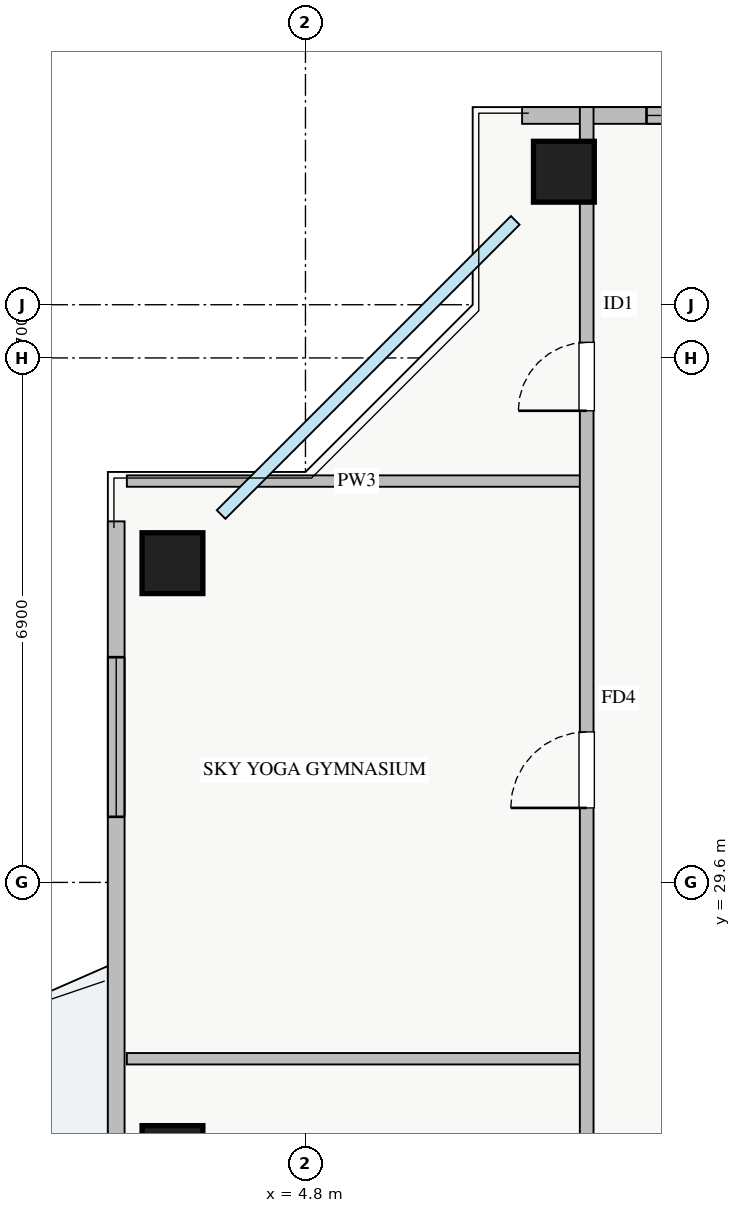
"""IFC4 building model, lengths in metres.
Left out: names, types, materials, properties, quantities, classifications, styles, units other than length and angle.
Written with IfcOpenShell. Run it as: python <this file> out.ifc"""

import sys

from ifc_helpers import new_model, si_unit, direction, frame, frame_2d, origin, origin_2d, place, context, subcontext, project, spatial, rectangle, extrude, source, transform, mapped, element, fill, save


model = new_model("IFC4")
c1 = context("Model", 3, precision=1e-05, world=origin(), true_north=direction((0.0, 1.0)))
c2 = subcontext(c1, "Body", "Model", "MODEL_VIEW")
j1 = project(units=[si_unit("LENGTHUNIT", "METRE"), si_unit("PLANEANGLEUNIT", "RADIAN")], contexts=[c1])
p1 = place(None, origin())
s1 = spatial("IfcSite", under=j1, at=p1, CompositionType="ELEMENT")
p2 = place(p1, origin())
s2 = spatial("IfcBuilding", under=s1, at=p2, CompositionType="ELEMENT")
p3 = place(p2, frame((0.0, 0.0, 223.0)))
s3 = spatial("IfcBuildingStorey", under=s2, at=p3, CompositionType="ELEMENT", Elevation=223.0)
m1 = source(origin(), c2, "Body", "SweptSolid", [
    extrude(rectangle(XDim=0.8, YDim=0.8, at=origin_2d()), origin(), (0.0, 0.0, 1.0), 3.25),
])
for number, where, z_axis, x_axis in (
    (1, (8.2, 38.95, 0.0), (0.0, 0.0, 1.0), (1.0, 0.0, 0.0)),
    (2, (3.05, 33.8, 0.0), (0.0, 0.0, 1.0), (1.0, 0.0, 0.0)),
    (3, (3.05, 26.0, 0.0), (0.0, 0.0, 1.0), (1.0, 0.0, 0.0)),
):
    element("IfcColumn", number, at=place(p3, frame(where, z_axis=z_axis, x_axis=x_axis)), inside=s3, PredefinedType="COLUMN", context=c2, shape_type="MappedRepresentation", body=[
        mapped(m1, transform((0.0, 0.0, 0.0), x_axis=(1.0, 0.0, 0.0), y_axis=(0.0, 1.0, 0.0), z_axis=(0.0, 0.0, 1.0), scale=1.0)),
    ])
p4 = place(p3, frame((7.65, 39.69, 0.0), z_axis=(0.0, 0.0, 1.0), x_axis=(1.0, 0.0, 0.0)))
e4 = element("IfcWall", 4, at=p4, inside=s3, PredefinedType="STANDARD", context=c2, shape_type="SweptSolid", body=[
    extrude(rectangle(XDim=22.7, YDim=0.22, at=frame_2d((11.35, 0.0))), origin(), (0.0, 0.0, 1.0), 2.61),
])
p5 = place(p4, frame((12.2, 0.0, 0.0)))
e5 = element("IfcOpeningElement", 5, at=p5, cuts=e4, PredefinedType="OPENING", context=c2, shape_type="SweptSolid", body=[
    extrude(rectangle(XDim=1.2, YDim=2.1, at=frame_2d((0.6, 1.05))), frame((0.0, 0.12, 0.0), z_axis=(0.0, -1.0, 0.0), x_axis=(1.0, 0.0, 0.0)), (0.0, 0.0, 1.0), 0.24),
])
p6 = place(p4, frame((1.637, 0.0, 0.9)))
e6 = element("IfcOpeningElement", 6, at=p6, cuts=e4, PredefinedType="OPENING", context=c2, shape_type="SweptSolid", body=[
    extrude(rectangle(XDim=2.4, YDim=1.48, at=frame_2d((1.2, 0.74))), frame((0.0, 0.12, 0.0), z_axis=(0.0, -1.0, 0.0), x_axis=(1.0, 0.0, 0.0)), (0.0, 0.0, 1.0), 0.24),
])
p7 = place(p4, frame((7.612, 0.0, 0.9)))
e7 = element("IfcOpeningElement", 7, at=p7, cuts=e4, PredefinedType="OPENING", context=c2, shape_type="SweptSolid", body=[
    extrude(rectangle(XDim=1.8, YDim=1.45, at=frame_2d((0.9, 0.725))), frame((0.0, 0.12, 0.0), z_axis=(0.0, -1.0, 0.0), x_axis=(1.0, 0.0, 0.0)), (0.0, 0.0, 1.0), 0.24),
])
p8 = place(p4, frame((18.812, 0.0, 0.9)))
e8 = element("IfcOpeningElement", 8, at=p8, cuts=e4, PredefinedType="OPENING", context=c2, shape_type="SweptSolid", body=[
    extrude(rectangle(XDim=2.1, YDim=1.48, at=frame_2d((1.05, 0.74))), frame((0.0, 0.12, 0.0), z_axis=(0.0, -1.0, 0.0), x_axis=(1.0, 0.0, 0.0)), (0.0, 0.0, 1.0), 0.24),
])
p9 = place(p3, frame((2.31, 11.65, 0.0), z_axis=(0.0, 0.0, 1.0), x_axis=(0.0, 1.0, 0.0)))
e9 = element("IfcWall", 9, at=p9, inside=s3, PredefinedType="STANDARD", context=c2, shape_type="SweptSolid", body=[
    extrude(rectangle(XDim=22.7, YDim=0.22, at=frame_2d((11.35, 0.0))), origin(), (0.0, 0.0, 1.0), 2.61),
])
p10 = place(p9, frame((12.2, 0.0, 0.0)))
e10 = element("IfcOpeningElement", 10, at=p10, cuts=e9, PredefinedType="OPENING", context=c2, shape_type="SweptSolid", body=[
    extrude(rectangle(XDim=1.2, YDim=2.1, at=frame_2d((0.6, 1.05))), frame((0.0, 0.12, 0.0), z_axis=(0.0, -1.0, 0.0), x_axis=(1.0, 0.0, 0.0)), (0.0, 0.0, 1.0), 0.24),
])
p11 = place(p9, frame((1.638, 0.0, 0.9)))
e11 = element("IfcOpeningElement", 11, at=p11, cuts=e9, PredefinedType="OPENING", context=c2, shape_type="SweptSolid", body=[
    extrude(rectangle(XDim=2.4, YDim=1.48, at=frame_2d((1.2, 0.74))), frame((0.0, 0.12, 0.0), z_axis=(0.0, -1.0, 0.0), x_axis=(1.0, 0.0, 0.0)), (0.0, 0.0, 1.0), 0.24),
])
p12 = place(p9, frame((18.813, 0.0, 0.9)))
e12 = element("IfcOpeningElement", 12, at=p12, cuts=e9, PredefinedType="OPENING", context=c2, shape_type="SweptSolid", body=[
    extrude(rectangle(XDim=2.1, YDim=1.48, at=frame_2d((1.05, 0.74))), frame((0.0, 0.12, 0.0), z_axis=(0.0, -1.0, 0.0), x_axis=(1.0, 0.0, 0.0)), (0.0, 0.0, 1.0), 0.24),
])
for number, where, z_axis, x_axis in (
    (13, (2.45, 34.88, 0.0), (0.0, 0.0, 1.0), (1.0, 0.0, 0.0)),
    (14, (2.45, 27.28, 0.0), (0.0, 0.0, 1.0), (1.0, 0.0, 0.0)),
):
    element("IfcWall", number, at=place(p3, frame(where, z_axis=z_axis, x_axis=x_axis)), inside=s3, PredefinedType="PARTITIONING", context=c2, shape_type="SweptSolid", body=[
        extrude(rectangle(XDim=6.05, YDim=0.15, at=frame_2d((3.025, 0.0))), origin(), (0.0, 0.0, 1.0), 3.07),
    ])
p13 = place(p3, frame((8.5, 6.2, 0.0), z_axis=(0.0, 0.0, 1.0), x_axis=(0.0, 1.0, 0.0)))
e15 = element("IfcWall", 15, at=p13, inside=s3, PredefinedType="PARTITIONING", context=c2, shape_type="SweptSolid", body=[
    extrude(rectangle(XDim=33.6, YDim=0.18, at=frame_2d((16.8, 0.0))), origin(), (0.0, 0.0, 1.0), 3.07),
])
p14 = place(p13, frame((29.605, 0.0, 0.0)))
e16 = element("IfcOpeningElement", 16, at=p14, cuts=e15, PredefinedType="OPENING", context=c2, shape_type="SweptSolid", body=[
    extrude(rectangle(XDim=0.9, YDim=2.05, at=frame_2d((0.45, 1.025))), frame((0.0, 0.1, 0.0), z_axis=(0.0, -1.0, 0.0), x_axis=(1.0, 0.0, 0.0)), (0.0, 0.0, 1.0), 0.2),
])
p15 = place(p13, frame((2.92, 0.0, 0.0)))
e17 = element("IfcOpeningElement", 17, at=p15, cuts=e15, PredefinedType="OPENING", context=c2, shape_type="SweptSolid", body=[
    extrude(rectangle(XDim=0.9, YDim=2.05, at=frame_2d((0.45, 1.025))), frame((0.0, 0.1, 0.0), z_axis=(0.0, -1.0, 0.0), x_axis=(1.0, 0.0, 0.0)), (0.0, 0.0, 1.0), 0.2),
])
p16 = place(p13, frame((8.46, 0.0, 0.0)))
e18 = element("IfcOpeningElement", 18, at=p16, cuts=e15, PredefinedType="OPENING", context=c2, shape_type="SweptSolid", body=[
    extrude(rectangle(XDim=1.0, YDim=2.05, at=frame_2d((0.5, 1.025))), frame((0.0, 0.1, 0.0), z_axis=(0.0, -1.0, 0.0), x_axis=(1.0, 0.0, 0.0)), (0.0, 0.0, 1.0), 0.2),
])
p17 = place(p13, frame((16.54, 0.0, 0.0)))
e19 = element("IfcOpeningElement", 19, at=p17, cuts=e15, PredefinedType="OPENING", context=c2, shape_type="SweptSolid", body=[
    extrude(rectangle(XDim=1.0, YDim=2.05, at=frame_2d((0.5, 1.025))), frame((0.0, 0.1, 0.0), z_axis=(0.0, -1.0, 0.0), x_axis=(1.0, 0.0, 0.0)), (0.0, 0.0, 1.0), 0.2),
])
p18 = place(p13, frame((24.38, 0.0, 0.0)))
e20 = element("IfcOpeningElement", 20, at=p18, cuts=e15, PredefinedType="OPENING", context=c2, shape_type="SweptSolid", body=[
    extrude(rectangle(XDim=1.0, YDim=2.05, at=frame_2d((0.5, 1.025))), frame((0.0, 0.1, 0.0), z_axis=(0.0, -1.0, 0.0), x_axis=(1.0, 0.0, 0.0)), (0.0, 0.0, 1.0), 0.2),
])
m2 = source(origin(), c2, "Body", "SweptSolid", [
    extrude(rectangle(XDim=2.4, YDim=1.48, at=frame_2d((1.2, 0.74))), frame((0.0, 0.03, 0.0), z_axis=(0.0, -1.0, 0.0), x_axis=(1.0, 0.0, 0.0)), (0.0, 0.0, 1.0), 0.06),
])
p19 = place(p6, origin())
e21 = element("IfcWindow", 21, at=p19, inside=s3, PartitioningType="TRIPLE_PANEL_VERTICAL", PredefinedType="WINDOW", context=c2, shape_type="MappedRepresentation", body=[
    mapped(m2, transform((0.0, 0.0, 0.0), x_axis=(1.0, 0.0, 0.0), y_axis=(0.0, 1.0, 0.0), z_axis=(0.0, 0.0, 1.0), scale=1.0)),
])
fill(e6, e21)
m3 = source(origin(), c2, "Body", "SweptSolid", [
    extrude(rectangle(XDim=2.1, YDim=1.48, at=frame_2d((1.05, 0.74))), frame((0.0, 0.03, 0.0), z_axis=(0.0, -1.0, 0.0), x_axis=(1.0, 0.0, 0.0)), (0.0, 0.0, 1.0), 0.06),
])
p20 = place(p12, origin())
e22 = element("IfcWindow", 22, at=p20, inside=s3, PartitioningType="TRIPLE_PANEL_VERTICAL", PredefinedType="WINDOW", context=c2, shape_type="MappedRepresentation", body=[
    mapped(m3, transform((0.0, 0.0, 0.0), x_axis=(1.0, 0.0, 0.0), y_axis=(0.0, 1.0, 0.0), z_axis=(0.0, 0.0, 1.0), scale=1.0)),
])
fill(e12, e22)
m4 = source(origin(), c2, "Body", "SweptSolid", [
    extrude(rectangle(XDim=0.9, YDim=2.05, at=frame_2d((0.45, 1.025))), frame((0.0, 0.025, 0.0), z_axis=(0.0, -1.0, 0.0), x_axis=(1.0, 0.0, 0.0)), (0.0, 0.0, 1.0), 0.05),
])
p21 = place(p14, origin())
e23 = element("IfcDoor", 23, at=p21, inside=s3, OperationType="SINGLE_SWING_LEFT", PredefinedType="DOOR", context=c2, shape_type="MappedRepresentation", body=[
    mapped(m4, transform((0.0, 0.0, 0.0), x_axis=(1.0, 0.0, 0.0), y_axis=(0.0, 1.0, 0.0), z_axis=(0.0, 0.0, 1.0), scale=1.0)),
])
fill(e16, e23)
m5 = source(origin(), c2, "Body", "SweptSolid", [
    extrude(rectangle(XDim=1.0, YDim=2.05, at=frame_2d((0.5, 1.025))), frame((0.0, 0.025, 0.0), z_axis=(0.0, -1.0, 0.0), x_axis=(1.0, 0.0, 0.0)), (0.0, 0.0, 1.0), 0.05),
])
p22 = place(p18, origin())
e24 = element("IfcDoor", 24, at=p22, inside=s3, OperationType="SINGLE_SWING_LEFT", PredefinedType="DOOR", context=c2, shape_type="MappedRepresentation", body=[
    mapped(m5, transform((0.0, 0.0, 0.0), x_axis=(1.0, 0.0, 0.0), y_axis=(0.0, 1.0, 0.0), z_axis=(0.0, 0.0, 1.0), scale=1.0)),
])
fill(e20, e24)
save(model, sys.argv[1])
